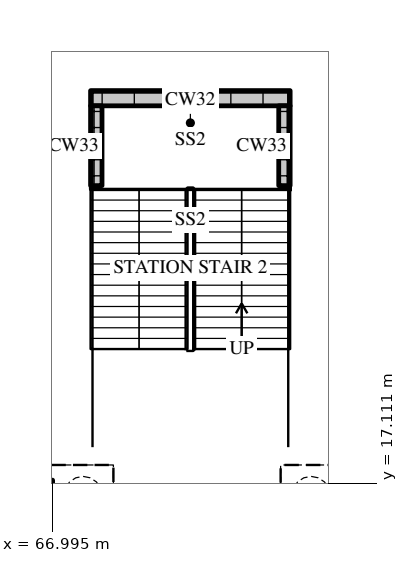
"""IFC4 building model, lengths in metres.
Left out: names, types, materials, properties, quantities, classifications, styles, units other than length and angle.
Written with IfcOpenShell. Run it as: python <this file> out.ifc"""

import sys

from ifc_helpers import new_model, si_unit, direction, frame, frame_2d, origin, origin_2d, place, context, subcontext, project, spatial, rectangle, extrude, element, save


model = new_model("IFC4")
c1 = context("Model", 3, precision=1e-05, world=origin(), true_north=direction((0.0, 1.0)))
c2 = subcontext(c1, "Body", "Model", "MODEL_VIEW")
j1 = project(units=[si_unit("LENGTHUNIT", "METRE"), si_unit("PLANEANGLEUNIT", "RADIAN")], contexts=[c1])
p1 = place(None, origin())
s1 = spatial("IfcSite", under=j1, at=p1, CompositionType="ELEMENT")
p2 = place(p1, origin())
s2 = spatial("IfcBuilding", under=s1, at=p2, CompositionType="ELEMENT")
p3 = place(p2, frame((0.0, 0.0, -6.0)))
s3 = spatial("IfcBuildingStorey", under=s2, at=p3, CompositionType="ELEMENT", Elevation=-6.0)
p4 = place(p3, frame((66.6, 16.8, 0.0), z_axis=(0.0, 0.0, 1.0), x_axis=(1.0, 0.0, 0.0)))
e1 = element("IfcColumn", 1, at=p4, inside=s3, PredefinedType="COLUMN", context=c2, shape_type="SweptSolid", body=[
    extrude(rectangle(XDim=0.8, YDim=0.8, at=origin_2d()), origin(), (0.0, 0.0, 1.0), 6.0),
])
p5 = place(p3, frame((73.25, 27.25, 0.0), z_axis=(0.0, 0.0, 1.0), x_axis=(-1.0, 0.0, 0.0)))
e2 = element("IfcWall", 2, at=p5, inside=s3, PredefinedType="SOLIDWALL", context=c2, shape_type="SweptSolid", body=[
    extrude(rectangle(XDim=5.25, YDim=0.4, at=frame_2d((2.625, 0.0))), origin(), (0.0, 0.0, 1.0), 2.8),
])
for number, where, z_axis, x_axis in (
    (3, (73.1, 24.95, 0.0), (0.0, 0.0, 1.0), (0.0, 1.0, 0.0)),
    (4, (68.15, 24.95, 0.0), (0.0, 0.0, 1.0), (0.0, 1.0, 0.0)),
):
    element("IfcWall", number, at=place(p3, frame(where, z_axis=z_axis, x_axis=x_axis)), inside=s3, PredefinedType="SOLIDWALL", context=c2, shape_type="SweptSolid", body=[
        extrude(rectangle(XDim=2.1, YDim=0.3, at=frame_2d((1.05, 0.0))), origin(), (0.0, 0.0, 1.0), 2.8),
    ])
save(model, sys.argv[1])
